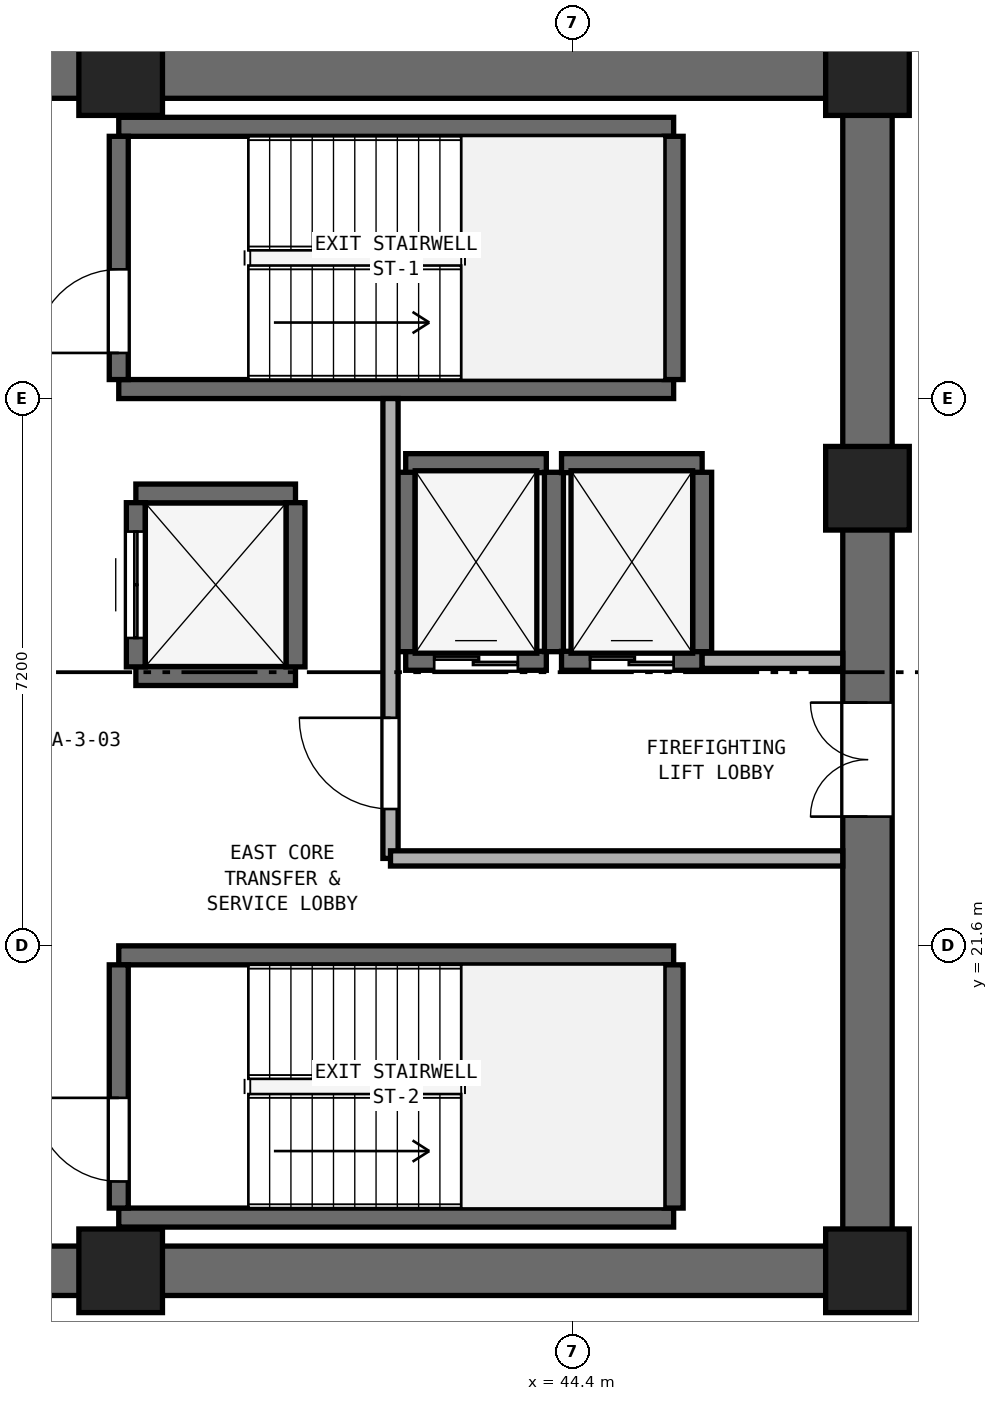
"""IFC4 building model, lengths in metres.
Left out: names, types, materials, properties, quantities, classifications, styles, units other than length and angle.
Written with IfcOpenShell. Run it as: python <this file> out.ifc"""

import sys

from ifc_helpers import new_model, si_unit, direction, frame, frame_2d, origin, origin_2d, place, context, subcontext, project, spatial, rectangle, extrude, element, fill, save


model = new_model("IFC4")
c1 = context("Model", 3, precision=1e-05, world=origin(), true_north=direction((0.0, 1.0)))
c2 = subcontext(c1, "Body", "Model", "MODEL_VIEW")
j1 = project(units=[si_unit("LENGTHUNIT", "METRE"), si_unit("PLANEANGLEUNIT", "RADIAN")], contexts=[c1])
p1 = place(None, origin())
s1 = spatial("IfcSite", under=j1, at=p1, CompositionType="ELEMENT")
p2 = place(p1, origin())
s2 = spatial("IfcBuilding", under=s1, at=p2, CompositionType="ELEMENT")
p3 = place(p2, frame((0.0, 0.0, 66.8)))
s3 = spatial("IfcBuildingStorey", under=s2, at=p3, CompositionType="ELEMENT", Elevation=66.8)
for number, where, z_axis, x_axis in (
    (1, (25.4, 17.325, 0.0), (0.0, 0.0, 1.0), (1.0, 0.0, 0.0)),
    (2, (25.4, 33.075, 0.0), (0.0, 0.0, 1.0), (1.0, 0.0, 0.0)),
):
    element("IfcWall", number, at=place(p3, frame(where, z_axis=z_axis, x_axis=x_axis)), inside=s3, PredefinedType="SHEAR", context=c2, shape_type="SweptSolid", body=[
        extrude(rectangle(XDim=23.2, YDim=0.65, at=frame_2d((11.6, 0.0))), origin(), (0.0, 0.0, 1.0), 3.525),
    ])
p4 = place(p3, frame((48.275, 17.65, 0.0), z_axis=(0.0, 0.0, 1.0), x_axis=(0.0, 1.0, 0.0)))
e3 = element("IfcWall", 3, at=p4, inside=s3, PredefinedType="SHEAR", context=c2, shape_type="SweptSolid", body=[
    extrude(rectangle(XDim=15.1, YDim=0.65, at=frame_2d((7.55, 0.0))), origin(), (0.0, 0.0, 1.0), 3.525),
])
p5 = place(p4, frame((5.65, 0.0, 0.0)))
e4 = element("IfcOpeningElement", 4, at=p5, cuts=e3, PredefinedType="OPENING", context=c2, shape_type="SweptSolid", body=[
    extrude(rectangle(XDim=1.5, YDim=2.15, at=frame_2d((0.75, 1.075))), frame((0.0, 0.335, 0.0), z_axis=(0.0, -1.0, 0.0), x_axis=(1.0, 0.0, 0.0)), (0.0, 0.0, 1.0), 0.67),
])
for number, where, z_axis, x_axis in (
    (5, (38.45, 17.325, 0.0), (0.0, 0.0, 1.0), (1.0, 0.0, 0.0)),
    (6, (48.275, 17.325, 0.0), (0.0, 0.0, 1.0), (1.0, 0.0, 0.0)),
    (7, (48.275, 27.62, 0.0), (0.0, 0.0, 1.0), (1.0, 0.0, 0.0)),
    (8, (48.275, 33.075, 0.0), (0.0, 0.0, 1.0), (1.0, 0.0, 0.0)),
    (9, (38.45, 33.075, 0.0), (0.0, 0.0, 1.0), (1.0, 0.0, 0.0)),
):
    element("IfcColumn", number, at=place(p3, frame(where, z_axis=z_axis, x_axis=x_axis)), inside=s3, PredefinedType="PILASTER", context=c2, shape_type="SweptSolid", body=[
        extrude(rectangle(XDim=1.1, YDim=1.1, at=origin_2d()), origin(), (0.0, 0.0, 1.0), 3.8),
    ])
for number, where, z_axis, x_axis in (
    (10, (38.425, 28.925, 0.0), (0.0, 0.0, 1.0), (1.0, 0.0, 0.0)),
    (11, (38.425, 32.375, 0.0), (0.0, 0.0, 1.0), (1.0, 0.0, 0.0)),
):
    element("IfcWall", number, at=place(p3, frame(where, z_axis=z_axis, x_axis=x_axis)), inside=s3, PredefinedType="SHEAR", context=c2, shape_type="SweptSolid", body=[
        extrude(rectangle(XDim=7.3, YDim=0.25, at=frame_2d((3.65, 0.0))), origin(), (0.0, 0.0, 1.0), 3.525),
    ])
p6 = place(p3, frame((38.425, 29.05, 0.0), z_axis=(0.0, 0.0, 1.0), x_axis=(0.0, 1.0, 0.0)))
e12 = element("IfcWall", 12, at=p6, inside=s3, PredefinedType="SHEAR", context=c2, shape_type="SweptSolid", body=[
    extrude(rectangle(XDim=3.2, YDim=0.25, at=frame_2d((1.6, 0.0))), origin(), (0.0, 0.0, 1.0), 3.525),
])
p7 = place(p6, frame((0.35, 0.0, 0.0)))
e13 = element("IfcOpeningElement", 13, at=p7, cuts=e12, PredefinedType="OPENING", context=c2, shape_type="SweptSolid", body=[
    extrude(rectangle(XDim=1.1, YDim=2.15, at=frame_2d((0.55, 1.075))), frame((0.0, 0.135, 0.0), z_axis=(0.0, -1.0, 0.0), x_axis=(1.0, 0.0, 0.0)), (0.0, 0.0, 1.0), 0.27),
])
p8 = place(p3, frame((45.725, 29.05, 0.0), z_axis=(0.0, 0.0, 1.0), x_axis=(0.0, 1.0, 0.0)))
e14 = element("IfcWall", 14, at=p8, inside=s3, PredefinedType="SHEAR", context=c2, shape_type="SweptSolid", body=[
    extrude(rectangle(XDim=3.2, YDim=0.25, at=frame_2d((1.6, 0.0))), origin(), (0.0, 0.0, 1.0), 3.525),
])
for number, where, z_axis, x_axis in (
    (15, (38.425, 18.025, 0.0), (0.0, 0.0, 1.0), (1.0, 0.0, 0.0)),
    (16, (38.425, 21.475, 0.0), (0.0, 0.0, 1.0), (1.0, 0.0, 0.0)),
):
    element("IfcWall", number, at=place(p3, frame(where, z_axis=z_axis, x_axis=x_axis)), inside=s3, PredefinedType="SHEAR", context=c2, shape_type="SweptSolid", body=[
        extrude(rectangle(XDim=7.3, YDim=0.25, at=frame_2d((3.65, 0.0))), origin(), (0.0, 0.0, 1.0), 3.525),
    ])
p9 = place(p3, frame((38.425, 18.15, 0.0), z_axis=(0.0, 0.0, 1.0), x_axis=(0.0, 1.0, 0.0)))
e17 = element("IfcWall", 17, at=p9, inside=s3, PredefinedType="SHEAR", context=c2, shape_type="SweptSolid", body=[
    extrude(rectangle(XDim=3.2, YDim=0.25, at=frame_2d((1.6, 0.0))), origin(), (0.0, 0.0, 1.0), 3.525),
])
p10 = place(p9, frame((0.35, 0.0, 0.0)))
e18 = element("IfcOpeningElement", 18, at=p10, cuts=e17, PredefinedType="OPENING", context=c2, shape_type="SweptSolid", body=[
    extrude(rectangle(XDim=1.1, YDim=2.15, at=frame_2d((0.55, 1.075))), frame((0.0, 0.135, 0.0), z_axis=(0.0, -1.0, 0.0), x_axis=(1.0, 0.0, 0.0)), (0.0, 0.0, 1.0), 0.27),
])
p11 = place(p3, frame((45.725, 18.15, 0.0), z_axis=(0.0, 0.0, 1.0), x_axis=(0.0, 1.0, 0.0)))
e19 = element("IfcWall", 19, at=p11, inside=s3, PredefinedType="SHEAR", context=c2, shape_type="SweptSolid", body=[
    extrude(rectangle(XDim=3.2, YDim=0.25, at=frame_2d((1.6, 0.0))), origin(), (0.0, 0.0, 1.0), 3.525),
])
p12 = place(p3, frame((42.2, 25.35, 0.0), z_axis=(0.0, 0.0, 1.0), x_axis=(1.0, 0.0, 0.0)))
e20 = element("IfcWall", 20, at=p12, inside=s3, PredefinedType="SHEAR", context=c2, shape_type="SweptSolid", body=[
    extrude(rectangle(XDim=1.85, YDim=0.25, at=frame_2d((0.925, 0.0))), origin(), (0.0, 0.0, 1.0), 3.525),
])
p13 = place(p12, frame((0.375, 0.0, 0.0)))
e21 = element("IfcOpeningElement", 21, at=p13, cuts=e20, PredefinedType="OPENING", context=c2, shape_type="SweptSolid", body=[
    extrude(rectangle(XDim=1.1, YDim=2.15, at=frame_2d((0.55, 1.075))), frame((0.0, 0.135, 0.0), z_axis=(0.0, -1.0, 0.0), x_axis=(1.0, 0.0, 0.0)), (0.0, 0.0, 1.0), 0.27),
])
p14 = place(p3, frame((42.2, 27.95, 0.0), z_axis=(0.0, 0.0, 1.0), x_axis=(1.0, 0.0, 0.0)))
e22 = element("IfcWall", 22, at=p14, inside=s3, PredefinedType="SHEAR", context=c2, shape_type="SweptSolid", body=[
    extrude(rectangle(XDim=1.85, YDim=0.25, at=frame_2d((0.925, 0.0))), origin(), (0.0, 0.0, 1.0), 3.525),
])
for number, where, z_axis, x_axis in (
    (23, (42.2, 25.47, 0.0), (0.0, 0.0, 1.0), (0.0, 1.0, 0.0)),
    (24, (44.15, 25.47, 0.0), (0.0, 0.0, 1.0), (0.0, 1.0, 0.0)),
):
    element("IfcWall", number, at=place(p3, frame(where, z_axis=z_axis, x_axis=x_axis)), inside=s3, PredefinedType="SHEAR", context=c2, shape_type="SweptSolid", body=[
        extrude(rectangle(XDim=2.36, YDim=0.25, at=frame_2d((1.18, 0.0))), origin(), (0.0, 0.0, 1.0), 3.525),
    ])
p15 = place(p3, frame((44.25, 25.35, 0.0), z_axis=(0.0, 0.0, 1.0), x_axis=(1.0, 0.0, 0.0)))
e25 = element("IfcWall", 25, at=p15, inside=s3, PredefinedType="SHEAR", context=c2, shape_type="SweptSolid", body=[
    extrude(rectangle(XDim=1.85, YDim=0.25, at=frame_2d((0.925, 0.0))), origin(), (0.0, 0.0, 1.0), 3.525),
])
p16 = place(p15, frame((0.375, 0.0, 0.0)))
e26 = element("IfcOpeningElement", 26, at=p16, cuts=e25, PredefinedType="OPENING", context=c2, shape_type="SweptSolid", body=[
    extrude(rectangle(XDim=1.1, YDim=2.15, at=frame_2d((0.55, 1.075))), frame((0.0, 0.135, 0.0), z_axis=(0.0, -1.0, 0.0), x_axis=(1.0, 0.0, 0.0)), (0.0, 0.0, 1.0), 0.27),
])
p17 = place(p3, frame((44.25, 27.95, 0.0), z_axis=(0.0, 0.0, 1.0), x_axis=(1.0, 0.0, 0.0)))
e27 = element("IfcWall", 27, at=p17, inside=s3, PredefinedType="SHEAR", context=c2, shape_type="SweptSolid", body=[
    extrude(rectangle(XDim=1.85, YDim=0.25, at=frame_2d((0.925, 0.0))), origin(), (0.0, 0.0, 1.0), 3.525),
])
p18 = place(p3, frame((46.1, 25.47, 0.0), z_axis=(0.0, 0.0, 1.0), x_axis=(0.0, 1.0, 0.0)))
e28 = element("IfcWall", 28, at=p18, inside=s3, PredefinedType="SHEAR", context=c2, shape_type="SweptSolid", body=[
    extrude(rectangle(XDim=2.36, YDim=0.25, at=frame_2d((1.18, 0.0))), origin(), (0.0, 0.0, 1.0), 3.525),
])
for number, where, z_axis, x_axis in (
    (29, (38.65, 25.15, 0.0), (0.0, 0.0, 1.0), (1.0, 0.0, 0.0)),
    (30, (38.65, 27.55, 0.0), (0.0, 0.0, 1.0), (1.0, 0.0, 0.0)),
):
    element("IfcWall", number, at=place(p3, frame(where, z_axis=z_axis, x_axis=x_axis)), inside=s3, PredefinedType="SHEAR", context=c2, shape_type="SweptSolid", body=[
        extrude(rectangle(XDim=2.1, YDim=0.25, at=frame_2d((1.05, 0.0))), origin(), (0.0, 0.0, 1.0), 3.525),
    ])
p19 = place(p3, frame((38.65, 25.27, 0.0), z_axis=(0.0, 0.0, 1.0), x_axis=(0.0, 1.0, 0.0)))
e31 = element("IfcWall", 31, at=p19, inside=s3, PredefinedType="SHEAR", context=c2, shape_type="SweptSolid", body=[
    extrude(rectangle(XDim=2.16, YDim=0.25, at=frame_2d((1.08, 0.0))), origin(), (0.0, 0.0, 1.0), 3.525),
])
p20 = place(p19, frame((0.38, 0.0, 0.0)))
e32 = element("IfcOpeningElement", 32, at=p20, cuts=e31, PredefinedType="OPENING", context=c2, shape_type="SweptSolid", body=[
    extrude(rectangle(XDim=1.4, YDim=2.2, at=frame_2d((0.7, 1.1))), frame((0.0, 0.135, 0.0), z_axis=(0.0, -1.0, 0.0), x_axis=(1.0, 0.0, 0.0)), (0.0, 0.0, 1.0), 0.27),
])
p21 = place(p3, frame((40.75, 25.27, 0.0), z_axis=(0.0, 0.0, 1.0), x_axis=(0.0, 1.0, 0.0)))
e33 = element("IfcWall", 33, at=p21, inside=s3, PredefinedType="SHEAR", context=c2, shape_type="SweptSolid", body=[
    extrude(rectangle(XDim=2.16, YDim=0.25, at=frame_2d((1.08, 0.0))), origin(), (0.0, 0.0, 1.0), 3.525),
])
p22 = place(p3, frame((42.0, 22.75, 0.0), z_axis=(0.0, 0.0, 1.0), x_axis=(0.0, 1.0, 0.0)))
e34 = element("IfcWall", 34, at=p22, inside=s3, PredefinedType="SOLIDWALL", context=c2, shape_type="SweptSolid", body=[
    extrude(rectangle(XDim=6.05, YDim=0.2, at=frame_2d((3.025, 0.0))), origin(), (0.0, 0.0, 1.0), 3.525),
])
p23 = place(p22, frame((0.65, 0.0, 0.0)))
e35 = element("IfcOpeningElement", 35, at=p23, cuts=e34, PredefinedType="OPENING", context=c2, shape_type="SweptSolid", body=[
    extrude(rectangle(XDim=1.2, YDim=2.15, at=frame_2d((0.6, 1.075))), frame((0.0, 0.11, 0.0), z_axis=(0.0, -1.0, 0.0), x_axis=(1.0, 0.0, 0.0)), (0.0, 0.0, 1.0), 0.22),
])
p24 = place(p3, frame((42.0, 22.75, 0.0), z_axis=(0.0, 0.0, 1.0), x_axis=(1.0, 0.0, 0.0)))
e36 = element("IfcWall", 36, at=p24, inside=s3, PredefinedType="SOLIDWALL", context=c2, shape_type="SweptSolid", body=[
    extrude(rectangle(XDim=5.95, YDim=0.2, at=frame_2d((2.975, 0.0))), origin(), (0.0, 0.0, 1.0), 3.525),
])
p25 = place(p3, frame((46.1, 25.35, 0.0), z_axis=(0.0, 0.0, 1.0), x_axis=(1.0, 0.0, 0.0)))
e37 = element("IfcWall", 37, at=p25, inside=s3, PredefinedType="SOLIDWALL", context=c2, shape_type="SweptSolid", body=[
    extrude(rectangle(XDim=1.85, YDim=0.2, at=frame_2d((0.925, 0.0))), origin(), (0.0, 0.0, 1.0), 3.525),
])
p26 = place(p7, origin())
e38 = element("IfcDoor", 38, at=p26, inside=s3, OperationType="SINGLE_SWING_LEFT", PredefinedType="DOOR", context=c2, shape_type="SweptSolid", body=[
    extrude(rectangle(XDim=1.1, YDim=2.15, at=frame_2d((0.55, 1.075))), frame((0.0, 0.025, 0.0), z_axis=(0.0, -1.0, 0.0), x_axis=(1.0, 0.0, 0.0)), (0.0, 0.0, 1.0), 0.05),
])
fill(e13, e38)
p27 = place(p10, origin())
e39 = element("IfcDoor", 39, at=p27, inside=s3, OperationType="SINGLE_SWING_RIGHT", PredefinedType="DOOR", context=c2, shape_type="SweptSolid", body=[
    extrude(rectangle(XDim=1.1, YDim=2.15, at=frame_2d((0.55, 1.075))), frame((0.0, 0.025, 0.0), z_axis=(0.0, -1.0, 0.0), x_axis=(1.0, 0.0, 0.0)), (0.0, 0.0, 1.0), 0.05),
])
fill(e18, e39)
p28 = place(p13, origin())
e40 = element("IfcDoor", 40, at=p28, inside=s3, OperationType="DOUBLE_DOOR_SLIDING", PredefinedType="DOOR", context=c2, shape_type="SweptSolid", body=[
    extrude(rectangle(XDim=1.1, YDim=2.15, at=frame_2d((0.55, 1.075))), frame((0.0, 0.025, 0.0), z_axis=(0.0, -1.0, 0.0), x_axis=(1.0, 0.0, 0.0)), (0.0, 0.0, 1.0), 0.05),
])
fill(e21, e40)
p29 = place(p16, origin())
e41 = element("IfcDoor", 41, at=p29, inside=s3, OperationType="DOUBLE_DOOR_SLIDING", PredefinedType="DOOR", context=c2, shape_type="SweptSolid", body=[
    extrude(rectangle(XDim=1.1, YDim=2.15, at=frame_2d((0.55, 1.075))), frame((0.0, 0.025, 0.0), z_axis=(0.0, -1.0, 0.0), x_axis=(1.0, 0.0, 0.0)), (0.0, 0.0, 1.0), 0.05),
])
fill(e26, e41)
p30 = place(p20, origin())
e42 = element("IfcDoor", 42, at=p30, inside=s3, OperationType="DOUBLE_DOOR_SLIDING", PredefinedType="DOOR", context=c2, shape_type="SweptSolid", body=[
    extrude(rectangle(XDim=1.4, YDim=2.2, at=frame_2d((0.7, 1.1))), frame((0.0, 0.025, 0.0), z_axis=(0.0, -1.0, 0.0), x_axis=(1.0, 0.0, 0.0)), (0.0, 0.0, 1.0), 0.05),
])
fill(e32, e42)
p31 = place(p23, origin())
e43 = element("IfcDoor", 43, at=p31, inside=s3, OperationType="SINGLE_SWING_RIGHT", PredefinedType="DOOR", context=c2, shape_type="SweptSolid", body=[
    extrude(rectangle(XDim=1.2, YDim=2.15, at=frame_2d((0.6, 1.075))), frame((0.0, 0.025, 0.0), z_axis=(0.0, -1.0, 0.0), x_axis=(1.0, 0.0, 0.0)), (0.0, 0.0, 1.0), 0.05),
])
fill(e35, e43)
p32 = place(p5, origin())
e44 = element("IfcDoor", 44, at=p32, inside=s3, OperationType="DOUBLE_DOOR_SINGLE_SWING", PredefinedType="DOOR", context=c2, shape_type="SweptSolid", body=[
    extrude(rectangle(XDim=1.5, YDim=2.15, at=frame_2d((0.75, 1.075))), frame((0.0, 0.025, 0.0), z_axis=(0.0, -1.0, 0.0), x_axis=(1.0, 0.0, 0.0)), (0.0, 0.0, 1.0), 0.05),
])
fill(e4, e44)
save(model, sys.argv[1])
